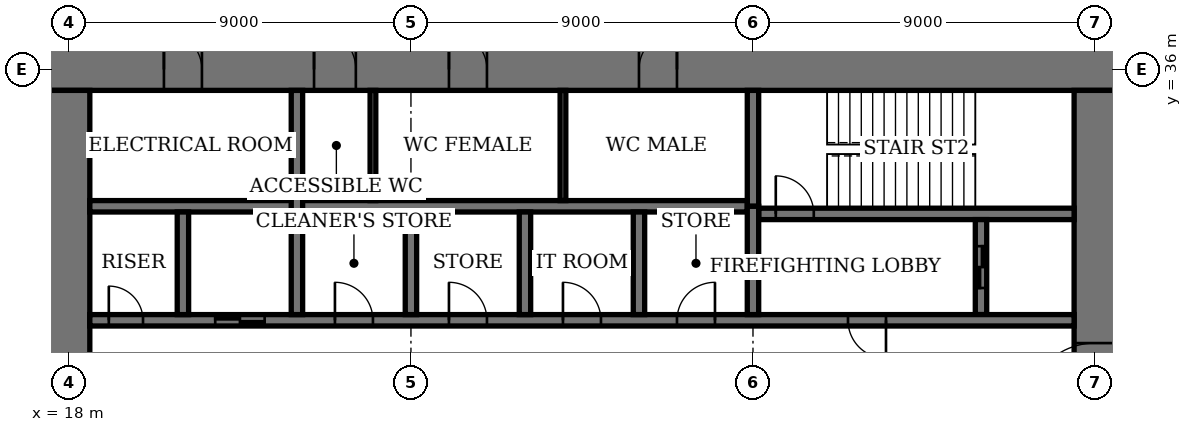
"""IFC4 building model, lengths in metres.
Left out: names, types, materials, properties, quantities, classifications, styles, units other than length and angle.
Written with IfcOpenShell. Run it as: python <this file> out.ifc"""

import sys

from ifc_helpers import new_model, si_unit, direction, frame, frame_2d, origin, place, context, subcontext, project, spatial, rectangle, extrude, element, fill, save


model = new_model("IFC4")
c1 = context("Model", 3, precision=1e-05, world=origin(), true_north=direction((0.0, 1.0)))
c2 = subcontext(c1, "Body", "Model", "MODEL_VIEW")
j1 = project(units=[si_unit("LENGTHUNIT", "METRE"), si_unit("PLANEANGLEUNIT", "RADIAN")], contexts=[c1])
p1 = place(None, origin())
s1 = spatial("IfcSite", under=j1, at=p1, CompositionType="ELEMENT")
p2 = place(p1, origin())
s2 = spatial("IfcBuilding", under=s1, at=p2, CompositionType="ELEMENT")
p3 = place(p2, frame((0.0, 0.0, 251.4)))
s3 = spatial("IfcBuildingStorey", under=s2, at=p3, CompositionType="ELEMENT", Elevation=251.4)
p4 = place(p3, frame((45.55, 36.0, 0.0), z_axis=(0.0, 0.0, 1.0), x_axis=(-1.0, 0.0, 0.0)))
e1 = element("IfcWall", 1, at=p4, inside=s3, PredefinedType="SHEAR", context=c2, shape_type="SweptSolid", body=[
    extrude(rectangle(XDim=28.1, YDim=1.1, at=frame_2d((14.05, 0.0))), origin(), (0.0, 0.0, 1.0), 4.0),
])
p5 = place(p4, frame((11.55, 0.0, 0.0)))
e2 = element("IfcOpeningElement", 2, at=p5, cuts=e1, PredefinedType="OPENING", context=c2, shape_type="SweptSolid", body=[
    extrude(rectangle(XDim=1.0, YDim=2.4, at=frame_2d((0.5, 1.2))), frame((0.0, 0.56, 0.0), z_axis=(0.0, -1.0, 0.0), x_axis=(1.0, 0.0, 0.0)), (0.0, 0.0, 1.0), 1.12),
])
p6 = place(p4, frame((16.55, 0.0, 0.0)))
e3 = element("IfcOpeningElement", 3, at=p6, cuts=e1, PredefinedType="OPENING", context=c2, shape_type="SweptSolid", body=[
    extrude(rectangle(XDim=1.0, YDim=2.4, at=frame_2d((0.5, 1.2))), frame((0.0, 0.56, 0.0), z_axis=(0.0, -1.0, 0.0), x_axis=(1.0, 0.0, 0.0)), (0.0, 0.0, 1.0), 1.12),
])
p7 = place(p4, frame((20.0, 0.0, 0.0)))
e4 = element("IfcOpeningElement", 4, at=p7, cuts=e1, PredefinedType="OPENING", context=c2, shape_type="SweptSolid", body=[
    extrude(rectangle(XDim=1.1, YDim=2.4, at=frame_2d((0.55, 1.2))), frame((0.0, 0.56, 0.0), z_axis=(0.0, -1.0, 0.0), x_axis=(1.0, 0.0, 0.0)), (0.0, 0.0, 1.0), 1.12),
])
p8 = place(p4, frame((24.05, 0.0, 0.0)))
e5 = element("IfcOpeningElement", 5, at=p8, cuts=e1, PredefinedType="OPENING", context=c2, shape_type="SweptSolid", body=[
    extrude(rectangle(XDim=1.0, YDim=2.4, at=frame_2d((0.5, 1.2))), frame((0.0, 0.56, 0.0), z_axis=(0.0, -1.0, 0.0), x_axis=(1.0, 0.0, 0.0)), (0.0, 0.0, 1.0), 1.12),
])
p9 = place(p3, frame((18.0, 35.45, 0.0), z_axis=(0.0, 0.0, 1.0), x_axis=(0.0, -1.0, 0.0)))
e6 = element("IfcWall", 6, at=p9, inside=s3, PredefinedType="SHEAR", context=c2, shape_type="SweptSolid", body=[
    extrude(rectangle(XDim=16.9, YDim=1.1, at=frame_2d((8.45, 0.0))), origin(), (0.0, 0.0, 1.0), 4.0),
])
p10 = place(p9, frame((8.45, 0.0, 0.0)))
e7 = element("IfcOpeningElement", 7, at=p10, cuts=e6, PredefinedType="OPENING", context=c2, shape_type="SweptSolid", body=[
    extrude(rectangle(XDim=1.8, YDim=2.4, at=frame_2d((0.9, 1.2))), frame((0.0, 0.56, 0.0), z_axis=(0.0, -1.0, 0.0), x_axis=(1.0, 0.0, 0.0)), (0.0, 0.0, 1.0), 1.12),
])
p11 = place(p3, frame((45.0, 18.55, 0.0), z_axis=(0.0, 0.0, 1.0), x_axis=(0.0, 1.0, 0.0)))
e8 = element("IfcWall", 8, at=p11, inside=s3, PredefinedType="SHEAR", context=c2, shape_type="SweptSolid", body=[
    extrude(rectangle(XDim=16.9, YDim=1.1, at=frame_2d((8.45, 0.0))), origin(), (0.0, 0.0, 1.0), 4.0),
])
p12 = place(p11, frame((8.45, 0.0, 0.0)))
e9 = element("IfcOpeningElement", 9, at=p12, cuts=e8, PredefinedType="OPENING", context=c2, shape_type="SweptSolid", body=[
    extrude(rectangle(XDim=1.8, YDim=2.4, at=frame_2d((0.9, 1.2))), frame((0.0, 0.56, 0.0), z_axis=(0.0, -1.0, 0.0), x_axis=(1.0, 0.0, 0.0)), (0.0, 0.0, 1.0), 1.12),
])
p13 = place(p3, frame((36.15, 32.2, 0.0), z_axis=(0.0, 0.0, 1.0), x_axis=(1.0, 0.0, 0.0)))
e10 = element("IfcWall", 10, at=p13, inside=s3, PredefinedType="SHEAR", context=c2, shape_type="SweptSolid", body=[
    extrude(rectangle(XDim=8.3, YDim=0.3, at=frame_2d((4.15, 0.0))), origin(), (0.0, 0.0, 1.0), 4.0),
])
p14 = place(p13, frame((0.45, 0.0, 0.0)))
e11 = element("IfcOpeningElement", 11, at=p14, cuts=e10, PredefinedType="OPENING", context=c2, shape_type="SweptSolid", body=[
    extrude(rectangle(XDim=1.0, YDim=2.4, at=frame_2d((0.5, 1.2))), frame((0.0, 0.16, 0.0), z_axis=(0.0, -1.0, 0.0), x_axis=(1.0, 0.0, 0.0)), (0.0, 0.0, 1.0), 0.32),
])
p15 = place(p3, frame((36.0, 32.4, 0.0), z_axis=(0.0, 0.0, 1.0), x_axis=(0.0, 1.0, 0.0)))
e12 = element("IfcWall", 12, at=p15, inside=s3, PredefinedType="SHEAR", context=c2, shape_type="SweptSolid", body=[
    extrude(rectangle(XDim=3.05, YDim=0.3, at=frame_2d((1.525, 0.0))), origin(), (0.0, 0.0, 1.0), 4.0),
])
p16 = place(p3, frame((42.0, 29.55, 0.0), z_axis=(0.0, 0.0, 1.0), x_axis=(0.0, 1.0, 0.0)))
e13 = element("IfcWall", 13, at=p16, inside=s3, PredefinedType="SHEAR", context=c2, shape_type="SweptSolid", body=[
    extrude(rectangle(XDim=2.5, YDim=0.3, at=frame_2d((1.25, 0.0))), origin(), (0.0, 0.0, 1.0), 4.0),
])
p17 = place(p16, frame((0.7, 0.0, 0.0)))
e14 = element("IfcOpeningElement", 14, at=p17, cuts=e13, PredefinedType="OPENING", context=c2, shape_type="SweptSolid", body=[
    extrude(rectangle(XDim=1.1, YDim=2.4, at=frame_2d((0.55, 1.2))), frame((0.0, 0.16, 0.0), z_axis=(0.0, -1.0, 0.0), x_axis=(1.0, 0.0, 0.0)), (0.0, 0.0, 1.0), 0.32),
])
p18 = place(p3, frame((18.55, 29.4, 0.0), z_axis=(0.0, 0.0, 1.0), x_axis=(1.0, 0.0, 0.0)))
e15 = element("IfcWall", 15, at=p18, inside=s3, PredefinedType="SHEAR", context=c2, shape_type="SweptSolid", body=[
    extrude(rectangle(XDim=25.9, YDim=0.3, at=frame_2d((12.95, 0.0))), origin(), (0.0, 0.0, 1.0), 4.0),
])
p19 = place(p18, frame((19.95, 0.0, 0.0)))
e16 = element("IfcOpeningElement", 16, at=p19, cuts=e15, PredefinedType="OPENING", context=c2, shape_type="SweptSolid", body=[
    extrude(rectangle(XDim=1.0, YDim=2.4, at=frame_2d((0.5, 1.2))), frame((0.0, 0.16, 0.0), z_axis=(0.0, -1.0, 0.0), x_axis=(1.0, 0.0, 0.0)), (0.0, 0.0, 1.0), 0.32),
])
p20 = place(p18, frame((0.5, 0.0, 0.0)))
e17 = element("IfcOpeningElement", 17, at=p20, cuts=e15, PredefinedType="OPENING", context=c2, shape_type="SweptSolid", body=[
    extrude(rectangle(XDim=0.9, YDim=2.1, at=frame_2d((0.45, 1.05))), frame((0.0, 0.16, 0.0), z_axis=(0.0, -1.0, 0.0), x_axis=(1.0, 0.0, 0.0)), (0.0, 0.0, 1.0), 0.32),
])
p21 = place(p18, frame((15.45, 0.0, 0.0)))
e18 = element("IfcOpeningElement", 18, at=p21, cuts=e15, PredefinedType="OPENING", context=c2, shape_type="SweptSolid", body=[
    extrude(rectangle(XDim=1.0, YDim=2.4, at=frame_2d((0.5, 1.2))), frame((0.0, 0.16, 0.0), z_axis=(0.0, -1.0, 0.0), x_axis=(1.0, 0.0, 0.0)), (0.0, 0.0, 1.0), 0.32),
])
p22 = place(p18, frame((12.45, 0.0, 0.0)))
e19 = element("IfcOpeningElement", 19, at=p22, cuts=e15, PredefinedType="OPENING", context=c2, shape_type="SweptSolid", body=[
    extrude(rectangle(XDim=1.0, YDim=2.4, at=frame_2d((0.5, 1.2))), frame((0.0, 0.16, 0.0), z_axis=(0.0, -1.0, 0.0), x_axis=(1.0, 0.0, 0.0)), (0.0, 0.0, 1.0), 0.32),
])
p23 = place(p18, frame((9.45, 0.0, 0.0)))
e20 = element("IfcOpeningElement", 20, at=p23, cuts=e15, PredefinedType="OPENING", context=c2, shape_type="SweptSolid", body=[
    extrude(rectangle(XDim=1.0, YDim=2.4, at=frame_2d((0.5, 1.2))), frame((0.0, 0.16, 0.0), z_axis=(0.0, -1.0, 0.0), x_axis=(1.0, 0.0, 0.0)), (0.0, 0.0, 1.0), 0.32),
])
p24 = place(p18, frame((6.45, 0.0, 0.0)))
e21 = element("IfcOpeningElement", 21, at=p24, cuts=e15, PredefinedType="OPENING", context=c2, shape_type="SweptSolid", body=[
    extrude(rectangle(XDim=1.0, YDim=2.4, at=frame_2d((0.5, 1.2))), frame((0.0, 0.16, 0.0), z_axis=(0.0, -1.0, 0.0), x_axis=(1.0, 0.0, 0.0)), (0.0, 0.0, 1.0), 0.32),
])
p25 = place(p18, frame((3.3, 0.0, 0.0)))
e22 = element("IfcOpeningElement", 22, at=p25, cuts=e15, PredefinedType="OPENING", context=c2, shape_type="SweptSolid", body=[
    extrude(rectangle(XDim=1.3, YDim=2.4, at=frame_2d((0.65, 1.2))), frame((0.0, 0.16, 0.0), z_axis=(0.0, -1.0, 0.0), x_axis=(1.0, 0.0, 0.0)), (0.0, 0.0, 1.0), 0.32),
])
p26 = place(p3, frame((18.55, 32.4, 0.0), z_axis=(0.0, 0.0, 1.0), x_axis=(1.0, 0.0, 0.0)))
e23 = element("IfcWall", 23, at=p26, inside=s3, PredefinedType="SHEAR", context=c2, shape_type="SweptSolid", body=[
    extrude(rectangle(XDim=17.3, YDim=0.3, at=frame_2d((8.65, 0.0))), origin(), (0.0, 0.0, 1.0), 4.0),
])
for number, where, z_axis, x_axis in (
    (24, (33.0, 29.55, 0.0), (0.0, 0.0, 1.0), (0.0, 1.0, 0.0)),
    (25, (30.0, 29.55, 0.0), (0.0, 0.0, 1.0), (0.0, 1.0, 0.0)),
    (26, (27.0, 29.55, 0.0), (0.0, 0.0, 1.0), (0.0, 1.0, 0.0)),
):
    element("IfcWall", number, at=place(p3, frame(where, z_axis=z_axis, x_axis=x_axis)), inside=s3, PredefinedType="SHEAR", context=c2, shape_type="SweptSolid", body=[
        extrude(rectangle(XDim=2.7, YDim=0.3, at=frame_2d((1.35, 0.0))), origin(), (0.0, 0.0, 1.0), 4.0),
    ])
p27 = place(p3, frame((24.0, 29.55, 0.0), z_axis=(0.0, 0.0, 1.0), x_axis=(0.0, 1.0, 0.0)))
e27 = element("IfcWall", 27, at=p27, inside=s3, PredefinedType="SHEAR", context=c2, shape_type="SweptSolid", body=[
    extrude(rectangle(XDim=5.9, YDim=0.3, at=frame_2d((2.95, 0.0))), origin(), (0.0, 0.0, 1.0), 4.0),
])
p28 = place(p3, frame((21.0, 29.55, 0.0), z_axis=(0.0, 0.0, 1.0), x_axis=(0.0, 1.0, 0.0)))
e28 = element("IfcWall", 28, at=p28, inside=s3, PredefinedType="SHEAR", context=c2, shape_type="SweptSolid", body=[
    extrude(rectangle(XDim=2.7, YDim=0.3, at=frame_2d((1.35, 0.0))), origin(), (0.0, 0.0, 1.0), 4.0),
])
p29 = place(p3, frame((36.0, 29.55, 0.0), z_axis=(0.0, 0.0, 1.0), x_axis=(0.0, 1.0, 0.0)))
e29 = element("IfcWall", 29, at=p29, inside=s3, PredefinedType="SHEAR", context=c2, shape_type="SweptSolid", body=[
    extrude(rectangle(XDim=2.85, YDim=0.3, at=frame_2d((1.425, 0.0))), origin(), (0.0, 0.0, 1.0), 4.0),
])
for number, where, z_axis, x_axis in (
    (30, (31.0, 32.55, 0.0), (0.0, 0.0, 1.0), (0.0, 1.0, 0.0)),
    (31, (26.0, 32.55, 0.0), (0.0, 0.0, 1.0), (0.0, 1.0, 0.0)),
):
    element("IfcWall", number, at=place(p3, frame(where, z_axis=z_axis, x_axis=x_axis)), inside=s3, PredefinedType="PARTITIONING", context=c2, shape_type="SweptSolid", body=[
        extrude(rectangle(XDim=2.9, YDim=0.15, at=frame_2d((1.45, 0.0))), origin(), (0.0, 0.0, 1.0), 3.75),
    ])
p30 = place(p12, origin())
e32 = element("IfcDoor", 32, at=p30, inside=s3, OperationType="DOUBLE_DOOR_DOUBLE_SWING", PredefinedType="DOOR", context=c2, shape_type="SweptSolid", body=[
    extrude(rectangle(XDim=1.8, YDim=2.4, at=frame_2d((0.9, 1.2))), frame((0.0, 0.03, 0.0), z_axis=(0.0, -1.0, 0.0), x_axis=(1.0, 0.0, 0.0)), (0.0, 0.0, 1.0), 0.06),
    extrude(rectangle(XDim=0.04, YDim=2.4, at=frame_2d((0.02, 1.2))), frame((0.0, 0.55, 0.0), z_axis=(0.0, -1.0, 0.0), x_axis=(1.0, 0.0, 0.0)), (0.0, 0.0, 1.0), 1.1),
    extrude(rectangle(XDim=0.04, YDim=2.4, at=frame_2d((1.78, 1.2))), frame((0.0, 0.55, 0.0), z_axis=(0.0, -1.0, 0.0), x_axis=(1.0, 0.0, 0.0)), (0.0, 0.0, 1.0), 1.1),
    extrude(rectangle(XDim=1.8, YDim=0.04, at=frame_2d((0.9, 2.38))), frame((0.0, 0.55, 0.0), z_axis=(0.0, -1.0, 0.0), x_axis=(1.0, 0.0, 0.0)), (0.0, 0.0, 1.0), 1.1),
])
fill(e9, e32)
p31 = place(p5, origin())
e33 = element("IfcDoor", 33, at=p31, inside=s3, OperationType="SINGLE_SWING_LEFT", PredefinedType="DOOR", context=c2, shape_type="SweptSolid", body=[
    extrude(rectangle(XDim=1.0, YDim=2.4, at=frame_2d((0.5, 1.2))), frame((0.0, 0.025, 0.0), z_axis=(0.0, -1.0, 0.0), x_axis=(1.0, 0.0, 0.0)), (0.0, 0.0, 1.0), 0.05),
    extrude(rectangle(XDim=0.04, YDim=2.4, at=frame_2d((0.02, 1.2))), frame((0.0, 0.4, 0.0), z_axis=(0.0, -1.0, 0.0), x_axis=(1.0, 0.0, 0.0)), (0.0, 0.0, 1.0), 0.8),
    extrude(rectangle(XDim=0.04, YDim=2.4, at=frame_2d((0.98, 1.2))), frame((0.0, 0.4, 0.0), z_axis=(0.0, -1.0, 0.0), x_axis=(1.0, 0.0, 0.0)), (0.0, 0.0, 1.0), 0.8),
    extrude(rectangle(XDim=1.0, YDim=0.04, at=frame_2d((0.5, 2.38))), frame((0.0, 0.4, 0.0), z_axis=(0.0, -1.0, 0.0), x_axis=(1.0, 0.0, 0.0)), (0.0, 0.0, 1.0), 0.8),
])
fill(e2, e33)
p32 = place(p6, origin())
e34 = element("IfcDoor", 34, at=p32, inside=s3, OperationType="SINGLE_SWING_RIGHT", PredefinedType="DOOR", context=c2, shape_type="SweptSolid", body=[
    extrude(rectangle(XDim=1.0, YDim=2.4, at=frame_2d((0.5, 1.2))), frame((0.0, 0.025, 0.0), z_axis=(0.0, -1.0, 0.0), x_axis=(1.0, 0.0, 0.0)), (0.0, 0.0, 1.0), 0.05),
    extrude(rectangle(XDim=0.04, YDim=2.4, at=frame_2d((0.02, 1.2))), frame((0.0, 0.4, 0.0), z_axis=(0.0, -1.0, 0.0), x_axis=(1.0, 0.0, 0.0)), (0.0, 0.0, 1.0), 0.8),
    extrude(rectangle(XDim=0.04, YDim=2.4, at=frame_2d((0.98, 1.2))), frame((0.0, 0.4, 0.0), z_axis=(0.0, -1.0, 0.0), x_axis=(1.0, 0.0, 0.0)), (0.0, 0.0, 1.0), 0.8),
    extrude(rectangle(XDim=1.0, YDim=0.04, at=frame_2d((0.5, 2.38))), frame((0.0, 0.4, 0.0), z_axis=(0.0, -1.0, 0.0), x_axis=(1.0, 0.0, 0.0)), (0.0, 0.0, 1.0), 0.8),
])
fill(e3, e34)
p33 = place(p7, origin())
e35 = element("IfcDoor", 35, at=p33, inside=s3, OperationType="SINGLE_SWING_RIGHT", PredefinedType="DOOR", context=c2, shape_type="SweptSolid", body=[
    extrude(rectangle(XDim=1.1, YDim=2.4, at=frame_2d((0.55, 1.2))), frame((0.0, 0.025, 0.0), z_axis=(0.0, -1.0, 0.0), x_axis=(1.0, 0.0, 0.0)), (0.0, 0.0, 1.0), 0.05),
    extrude(rectangle(XDim=0.04, YDim=2.4, at=frame_2d((0.02, 1.2))), frame((0.0, 0.44, 0.0), z_axis=(0.0, -1.0, 0.0), x_axis=(1.0, 0.0, 0.0)), (0.0, 0.0, 1.0), 0.88),
    extrude(rectangle(XDim=0.04, YDim=2.4, at=frame_2d((1.08, 1.2))), frame((0.0, 0.44, 0.0), z_axis=(0.0, -1.0, 0.0), x_axis=(1.0, 0.0, 0.0)), (0.0, 0.0, 1.0), 0.88),
    extrude(rectangle(XDim=1.1, YDim=0.04, at=frame_2d((0.55, 2.38))), frame((0.0, 0.44, 0.0), z_axis=(0.0, -1.0, 0.0), x_axis=(1.0, 0.0, 0.0)), (0.0, 0.0, 1.0), 0.88),
])
fill(e4, e35)
p34 = place(p8, origin())
e36 = element("IfcDoor", 36, at=p34, inside=s3, OperationType="SINGLE_SWING_RIGHT", PredefinedType="DOOR", context=c2, shape_type="SweptSolid", body=[
    extrude(rectangle(XDim=1.0, YDim=2.4, at=frame_2d((0.5, 1.2))), frame((0.0, 0.025, 0.0), z_axis=(0.0, -1.0, 0.0), x_axis=(1.0, 0.0, 0.0)), (0.0, 0.0, 1.0), 0.05),
    extrude(rectangle(XDim=0.04, YDim=2.4, at=frame_2d((0.02, 1.2))), frame((0.0, 0.4, 0.0), z_axis=(0.0, -1.0, 0.0), x_axis=(1.0, 0.0, 0.0)), (0.0, 0.0, 1.0), 0.8),
    extrude(rectangle(XDim=0.04, YDim=2.4, at=frame_2d((0.98, 1.2))), frame((0.0, 0.4, 0.0), z_axis=(0.0, -1.0, 0.0), x_axis=(1.0, 0.0, 0.0)), (0.0, 0.0, 1.0), 0.8),
    extrude(rectangle(XDim=1.0, YDim=0.04, at=frame_2d((0.5, 2.38))), frame((0.0, 0.4, 0.0), z_axis=(0.0, -1.0, 0.0), x_axis=(1.0, 0.0, 0.0)), (0.0, 0.0, 1.0), 0.8),
])
fill(e5, e36)
p35 = place(p14, origin())
e37 = element("IfcDoor", 37, at=p35, inside=s3, OperationType="SINGLE_SWING_RIGHT", PredefinedType="DOOR", context=c2, shape_type="SweptSolid", body=[
    extrude(rectangle(XDim=1.0, YDim=2.4, at=frame_2d((0.5, 1.2))), frame((0.0, 0.03, 0.0), z_axis=(0.0, -1.0, 0.0), x_axis=(1.0, 0.0, 0.0)), (0.0, 0.0, 1.0), 0.06),
])
fill(e11, e37)
p36 = place(p19, origin())
e38 = element("IfcDoor", 38, at=p36, inside=s3, OperationType="SINGLE_SWING_RIGHT", PredefinedType="DOOR", context=c2, shape_type="SweptSolid", body=[
    extrude(rectangle(XDim=1.0, YDim=2.4, at=frame_2d((0.5, 1.2))), frame((0.0, 0.03, 0.0), z_axis=(0.0, -1.0, 0.0), x_axis=(1.0, 0.0, 0.0)), (0.0, 0.0, 1.0), 0.06),
])
fill(e16, e38)
p37 = place(p20, origin())
e39 = element("IfcDoor", 39, at=p37, inside=s3, OperationType="SINGLE_SWING_RIGHT", PredefinedType="DOOR", context=c2, shape_type="SweptSolid", body=[
    extrude(rectangle(XDim=0.9, YDim=2.1, at=frame_2d((0.45, 1.05))), frame((0.0, 0.03, 0.0), z_axis=(0.0, -1.0, 0.0), x_axis=(1.0, 0.0, 0.0)), (0.0, 0.0, 1.0), 0.06),
])
fill(e17, e39)
p38 = place(p21, origin())
e40 = element("IfcDoor", 40, at=p38, inside=s3, OperationType="SINGLE_SWING_LEFT", PredefinedType="DOOR", context=c2, shape_type="SweptSolid", body=[
    extrude(rectangle(XDim=1.0, YDim=2.4, at=frame_2d((0.5, 1.2))), frame((0.0, 0.03, 0.0), z_axis=(0.0, -1.0, 0.0), x_axis=(1.0, 0.0, 0.0)), (0.0, 0.0, 1.0), 0.06),
])
fill(e18, e40)
p39 = place(p22, origin())
e41 = element("IfcDoor", 41, at=p39, inside=s3, OperationType="SINGLE_SWING_RIGHT", PredefinedType="DOOR", context=c2, shape_type="SweptSolid", body=[
    extrude(rectangle(XDim=1.0, YDim=2.4, at=frame_2d((0.5, 1.2))), frame((0.0, 0.03, 0.0), z_axis=(0.0, -1.0, 0.0), x_axis=(1.0, 0.0, 0.0)), (0.0, 0.0, 1.0), 0.06),
])
fill(e19, e41)
p40 = place(p23, origin())
e42 = element("IfcDoor", 42, at=p40, inside=s3, OperationType="SINGLE_SWING_RIGHT", PredefinedType="DOOR", context=c2, shape_type="SweptSolid", body=[
    extrude(rectangle(XDim=1.0, YDim=2.4, at=frame_2d((0.5, 1.2))), frame((0.0, 0.03, 0.0), z_axis=(0.0, -1.0, 0.0), x_axis=(1.0, 0.0, 0.0)), (0.0, 0.0, 1.0), 0.06),
])
fill(e20, e42)
p41 = place(p24, origin())
e43 = element("IfcDoor", 43, at=p41, inside=s3, OperationType="SINGLE_SWING_RIGHT", PredefinedType="DOOR", context=c2, shape_type="SweptSolid", body=[
    extrude(rectangle(XDim=1.0, YDim=2.4, at=frame_2d((0.5, 1.2))), frame((0.0, 0.03, 0.0), z_axis=(0.0, -1.0, 0.0), x_axis=(1.0, 0.0, 0.0)), (0.0, 0.0, 1.0), 0.06),
])
fill(e21, e43)
p42 = place(p25, origin())
e44 = element("IfcDoor", 44, at=p42, inside=s3, OperationType="DOUBLE_DOOR_SLIDING", PredefinedType="DOOR", context=c2, shape_type="SweptSolid", body=[
    extrude(rectangle(XDim=1.3, YDim=2.4, at=frame_2d((0.65, 1.2))), frame((0.0, 0.02, 0.0), z_axis=(0.0, -1.0, 0.0), x_axis=(1.0, 0.0, 0.0)), (0.0, 0.0, 1.0), 0.04),
])
fill(e22, e44)
p43 = place(p17, origin())
e45 = element("IfcDoor", 45, at=p43, inside=s3, OperationType="DOUBLE_DOOR_SLIDING", PredefinedType="DOOR", context=c2, shape_type="SweptSolid", body=[
    extrude(rectangle(XDim=1.1, YDim=2.4, at=frame_2d((0.55, 1.2))), frame((0.0, 0.03, 0.0), z_axis=(0.0, -1.0, 0.0), x_axis=(1.0, 0.0, 0.0)), (0.0, 0.0, 1.0), 0.06),
])
fill(e14, e45)
save(model, sys.argv[1])
